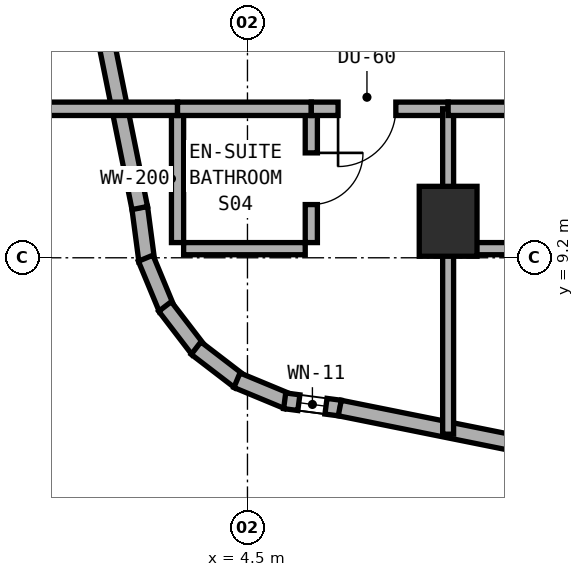
"""IFC4 building model, lengths in metres.
Left out: names, types, materials, properties, quantities, classifications, styles, units other than length and angle.
Written with IfcOpenShell. Run it as: python <this file> out.ifc"""

import sys

from ifc_helpers import new_model, si_unit, direction, frame, frame_2d, origin, origin_2d, place, context, subcontext, project, spatial, rectangle, extrude, element, fill, save


model = new_model("IFC4")
c1 = context("Model", 3, precision=1e-05, world=origin(), true_north=direction((0.0, 1.0)))
c2 = subcontext(c1, "Body", "Model", "MODEL_VIEW")
j1 = project(units=[si_unit("LENGTHUNIT", "METRE"), si_unit("PLANEANGLEUNIT", "RADIAN")], contexts=[c1])
p1 = place(None, origin())
s1 = spatial("IfcSite", under=j1, at=p1, CompositionType="ELEMENT")
p2 = place(p1, origin())
s2 = spatial("IfcBuilding", under=s1, at=p2, CompositionType="ELEMENT")
p3 = place(p2, frame((0.0, 0.0, 98.5)))
s3 = spatial("IfcBuildingStorey", under=s2, at=p3, CompositionType="ELEMENT", Elevation=98.5)
p4 = place(p3, frame((7.8, 9.8, 0.0), z_axis=(0.0, 0.0, 1.0), x_axis=(1.0, 0.0, 0.0)))
e1 = element("IfcColumn", 1, at=p4, inside=s3, PredefinedType="COLUMN", context=c2, shape_type="SweptSolid", body=[
    extrude(rectangle(XDim=0.95, YDim=1.15, at=origin_2d()), origin(), (0.0, 0.0, 1.0), 3.5),
])
p5 = place(p3, frame((2.728, 10.025, 0.0), z_axis=(0.0, 0.0, 1.0), x_axis=(0.130953706898, -0.991388484223, 0.0)))
e2 = element("IfcWall", 2, at=p5, inside=s3, PredefinedType="STANDARD", context=c2, shape_type="SweptSolid", body=[
    extrude(rectangle(XDim=0.885, YDim=0.26, at=frame_2d((0.443, 0.0))), origin(), (0.0, 0.0, 1.0), 3.22),
])
p6 = place(p3, frame((2.826, 9.193, 0.0), z_axis=(0.0, 0.0, 1.0), x_axis=(0.383290660547, -0.923627776508, 0.0)))
e3 = element("IfcWall", 3, at=p6, inside=s3, PredefinedType="STANDARD", context=c2, shape_type="SweptSolid", body=[
    extrude(rectangle(XDim=0.903, YDim=0.26, at=frame_2d((0.452, 0.0))), origin(), (0.0, 0.0, 1.0), 3.22),
])
p7 = place(p3, frame((3.144, 8.399, 0.0), z_axis=(0.0, 0.0, 1.0), x_axis=(0.608624690463, -0.793458244748, 0.0)))
e4 = element("IfcWall", 4, at=p7, inside=s3, PredefinedType="STANDARD", context=c2, shape_type="SweptSolid", body=[
    extrude(rectangle(XDim=0.902, YDim=0.26, at=frame_2d((0.451, 0.0))), origin(), (0.0, 0.0, 1.0), 3.22),
])
p8 = place(p3, frame((3.655, 7.714, 0.0), z_axis=(0.0, 0.0, 1.0), x_axis=(0.793558456666, -0.608494022858, 0.0)))
e5 = element("IfcWall", 5, at=p8, inside=s3, PredefinedType="STANDARD", context=c2, shape_type="SweptSolid", body=[
    extrude(rectangle(XDim=0.902, YDim=0.26, at=frame_2d((0.451, 0.0))), origin(), (0.0, 0.0, 1.0), 3.22),
])
p9 = place(p3, frame((4.327, 7.186, 0.0), z_axis=(0.0, 0.0, 1.0), x_axis=(0.923683767999, -0.383155708213, 0.0)))
e6 = element("IfcWall", 6, at=p9, inside=s3, PredefinedType="STANDARD", context=c2, shape_type="SweptSolid", body=[
    extrude(rectangle(XDim=0.903, YDim=0.26, at=frame_2d((0.451, 0.0))), origin(), (0.0, 0.0, 1.0), 3.22),
])
p10 = place(p3, frame((5.112, 6.848, 0.0), z_axis=(0.0, 0.0, 1.0), x_axis=(0.991487658083, -0.130200706103, 0.0)))
e7 = element("IfcWall", 7, at=p10, inside=s3, PredefinedType="STANDARD", context=c2, shape_type="SweptSolid", body=[
    extrude(rectangle(XDim=0.921, YDim=0.26, at=frame_2d((0.46, 0.0))), origin(), (0.0, 0.0, 1.0), 3.22),
])
p11 = place(p10, frame((0.235, 0.0, 0.85)))
e8 = element("IfcOpeningElement", 8, at=p11, cuts=e7, PredefinedType="OPENING", context=c2, shape_type="SweptSolid", body=[
    extrude(rectangle(XDim=0.45, YDim=1.5, at=frame_2d((0.225, 0.75))), frame((0.0, 0.14, 0.0), z_axis=(0.0, -1.0, 0.0), x_axis=(1.0, 0.0, 0.0)), (0.0, 0.0, 1.0), 0.28),
])
p12 = place(p3, frame((6.018, 6.729, 0.0), z_axis=(0.0, 0.0, 1.0), x_axis=(0.980315963543, -0.197435082048, 0.0)))
e9 = element("IfcWall", 9, at=p12, inside=s3, PredefinedType="STANDARD", context=c2, shape_type="SweptSolid", body=[
    extrude(rectangle(XDim=9.183, YDim=0.26, at=frame_2d((4.591, 0.0))), origin(), (0.0, 0.0, 1.0), 3.22),
])
p13 = place(p12, frame((4.337, 0.0, 0.8)))
e10 = element("IfcOpeningElement", 10, at=p13, cuts=e9, PredefinedType="OPENING", context=c2, shape_type="SweptSolid", body=[
    extrude(rectangle(XDim=2.4, YDim=1.6, at=frame_2d((1.2, 0.8))), frame((0.0, 0.14, 0.0), z_axis=(0.0, -1.0, 0.0), x_axis=(1.0, 0.0, 0.0)), (0.0, 0.0, 1.0), 0.28),
])
p14 = place(p3, frame((0.916, 19.02, 0.0), z_axis=(0.0, 0.0, 1.0), x_axis=(0.197435082048, -0.980315963543, 0.0)))
e11 = element("IfcWall", 11, at=p14, inside=s3, PredefinedType="STANDARD", context=c2, shape_type="SweptSolid", body=[
    extrude(rectangle(XDim=9.183, YDim=0.26, at=frame_2d((4.591, 0.0))), origin(), (0.0, 0.0, 1.0), 3.22),
])
p15 = place(p14, frame((2.497, 0.0, 0.8)))
e12 = element("IfcOpeningElement", 12, at=p15, cuts=e11, PredefinedType="OPENING", context=c2, shape_type="SweptSolid", body=[
    extrude(rectangle(XDim=2.4, YDim=1.6, at=frame_2d((1.2, 0.8))), frame((0.0, 0.14, 0.0), z_axis=(0.0, -1.0, 0.0), x_axis=(1.0, 0.0, 0.0)), (0.0, 0.0, 1.0), 0.28),
])
p16 = place(p3, frame((5.55, 9.45, 0.0), z_axis=(0.0, 0.0, 1.0), x_axis=(0.0, 1.0, 0.0)))
e13 = element("IfcWall", 13, at=p16, inside=s3, PredefinedType="PLUMBINGWALL", context=c2, shape_type="SweptSolid", body=[
    extrude(rectangle(XDim=2.1, YDim=0.2, at=frame_2d((1.05, 0.0))), origin(), (0.0, 0.0, 1.0), 3.22),
])
p17 = place(p16, frame((0.625, 0.0, 0.0)))
e14 = element("IfcOpeningElement", 14, at=p17, cuts=e13, PredefinedType="OPENING", context=c2, shape_type="SweptSolid", body=[
    extrude(rectangle(XDim=0.85, YDim=2.1, at=frame_2d((0.425, 1.05))), frame((0.0, 0.11, 0.0), z_axis=(0.0, -1.0, 0.0), x_axis=(1.0, 0.0, 0.0)), (0.0, 0.0, 1.0), 0.22),
])
p18 = place(p3, frame((3.45, 9.35, 0.0), z_axis=(0.0, 0.0, 1.0), x_axis=(1.0, 0.0, 0.0)))
e15 = element("IfcWall", 15, at=p18, inside=s3, PredefinedType="PLUMBINGWALL", context=c2, shape_type="SweptSolid", body=[
    extrude(rectangle(XDim=2.0, YDim=0.2, at=frame_2d((1.0, 0.0))), origin(), (0.0, 0.0, 1.0), 3.22),
])
p19 = place(p3, frame((3.35, 9.45, 0.0), z_axis=(0.0, 0.0, 1.0), x_axis=(0.0, 1.0, 0.0)))
e16 = element("IfcWall", 16, at=p19, inside=s3, PredefinedType="PLUMBINGWALL", context=c2, shape_type="SweptSolid", body=[
    extrude(rectangle(XDim=2.1, YDim=0.2, at=frame_2d((1.05, 0.0))), origin(), (0.0, 0.0, 1.0), 3.22),
])
p20 = place(p3, frame((0.96, 11.65, 0.0), z_axis=(0.0, 0.0, 1.0), x_axis=(1.0, 0.0, 0.0)))
e17 = element("IfcWall", 17, at=p20, inside=s3, PredefinedType="SOLIDWALL", context=c2, shape_type="SweptSolid", body=[
    extrude(rectangle(XDim=2.39, YDim=0.22, at=frame_2d((1.195, 0.0))), origin(), (0.0, 0.0, 1.0), 3.22),
])
p21 = place(p3, frame((3.35, 11.65, 0.0), z_axis=(0.0, 0.0, 1.0), x_axis=(1.0, 0.0, 0.0)))
e18 = element("IfcWall", 18, at=p21, inside=s3, PredefinedType="SOLIDWALL", context=c2, shape_type="SweptSolid", body=[
    extrude(rectangle(XDim=2.2, YDim=0.22, at=frame_2d((1.1, 0.0))), origin(), (0.0, 0.0, 1.0), 3.22),
])
p22 = place(p3, frame((5.55, 11.65, 0.0), z_axis=(0.0, 0.0, 1.0), x_axis=(1.0, 0.0, 0.0)))
e19 = element("IfcWall", 19, at=p22, inside=s3, PredefinedType="SOLIDWALL", context=c2, shape_type="SweptSolid", body=[
    extrude(rectangle(XDim=2.25, YDim=0.22, at=frame_2d((1.125, 0.0))), origin(), (0.0, 0.0, 1.0), 2.595),
])
p23 = place(p22, frame((0.44, 0.0, 0.0)))
e20 = element("IfcOpeningElement", 20, at=p23, cuts=e19, PredefinedType="OPENING", context=c2, shape_type="SweptSolid", body=[
    extrude(rectangle(XDim=0.95, YDim=2.1, at=frame_2d((0.475, 1.05))), frame((0.0, 0.12, 0.0), z_axis=(0.0, -1.0, 0.0), x_axis=(1.0, 0.0, 0.0)), (0.0, 0.0, 1.0), 0.24),
])
p24 = place(p3, frame((7.8, 6.299, 0.0), z_axis=(0.0, 0.0, 1.0), x_axis=(0.0, 1.0, 0.0)))
e21 = element("IfcWall", 21, at=p24, inside=s3, PredefinedType="SOLIDWALL", context=c2, shape_type="SweptSolid", body=[
    extrude(rectangle(XDim=5.351, YDim=0.18, at=frame_2d((2.675, 0.0))), origin(), (0.0, 0.0, 1.0), 2.595),
])
p25 = place(p3, frame((7.9, 9.35, 0.0), z_axis=(0.0, 0.0, 1.0), x_axis=(1.0, 0.0, 0.0)))
e22 = element("IfcWall", 22, at=p25, inside=s3, PredefinedType="PLUMBINGWALL", context=c2, shape_type="SweptSolid", body=[
    extrude(rectangle(XDim=2.0, YDim=0.2, at=frame_2d((1.0, 0.0))), origin(), (0.0, 0.0, 1.0), 3.22),
])
p26 = place(p3, frame((7.8, 11.65, 0.0), z_axis=(0.0, 0.0, 1.0), x_axis=(1.0, 0.0, 0.0)))
e23 = element("IfcWall", 23, at=p26, inside=s3, PredefinedType="SOLIDWALL", context=c2, shape_type="SweptSolid", body=[
    extrude(rectangle(XDim=2.2, YDim=0.22, at=frame_2d((1.1, 0.0))), origin(), (0.0, 0.0, 1.0), 2.595),
])
p27 = place(p11, origin())
e24 = element("IfcWindow", 24, at=p27, inside=s3, PartitioningType="SINGLE_PANEL", PredefinedType="WINDOW", context=c2, shape_type="SweptSolid", body=[
    extrude(rectangle(XDim=0.45, YDim=1.5, at=frame_2d((0.225, 0.75))), frame((0.0, 0.03, 0.0), z_axis=(0.0, -1.0, 0.0), x_axis=(1.0, 0.0, 0.0)), (0.0, 0.0, 1.0), 0.06),
])
fill(e8, e24)
p28 = place(p17, frame((0.85, 0.0, 0.0), z_axis=(0.0, 0.0, 1.0), x_axis=(-1.0, 0.0, 0.0)))
e25 = element("IfcDoor", 25, at=p28, inside=s3, OperationType="SINGLE_SWING_LEFT", PredefinedType="DOOR", context=c2, shape_type="SweptSolid", body=[
    extrude(rectangle(XDim=0.85, YDim=2.1, at=frame_2d((0.425, 1.05))), frame((0.0, 0.025, 0.0), z_axis=(0.0, -1.0, 0.0), x_axis=(1.0, 0.0, 0.0)), (0.0, 0.0, 1.0), 0.05),
])
fill(e14, e25)
p29 = place(p23, frame((0.95, 0.0, 0.0), z_axis=(0.0, 0.0, 1.0), x_axis=(-1.0, 0.0, 0.0)))
e26 = element("IfcDoor", 26, at=p29, inside=s3, OperationType="SINGLE_SWING_RIGHT", PredefinedType="DOOR", context=c2, shape_type="SweptSolid", body=[
    extrude(rectangle(XDim=0.95, YDim=2.1, at=frame_2d((0.475, 1.05))), frame((0.0, 0.025, 0.0), z_axis=(0.0, -1.0, 0.0), x_axis=(1.0, 0.0, 0.0)), (0.0, 0.0, 1.0), 0.05),
])
fill(e20, e26)
save(model, sys.argv[1])
